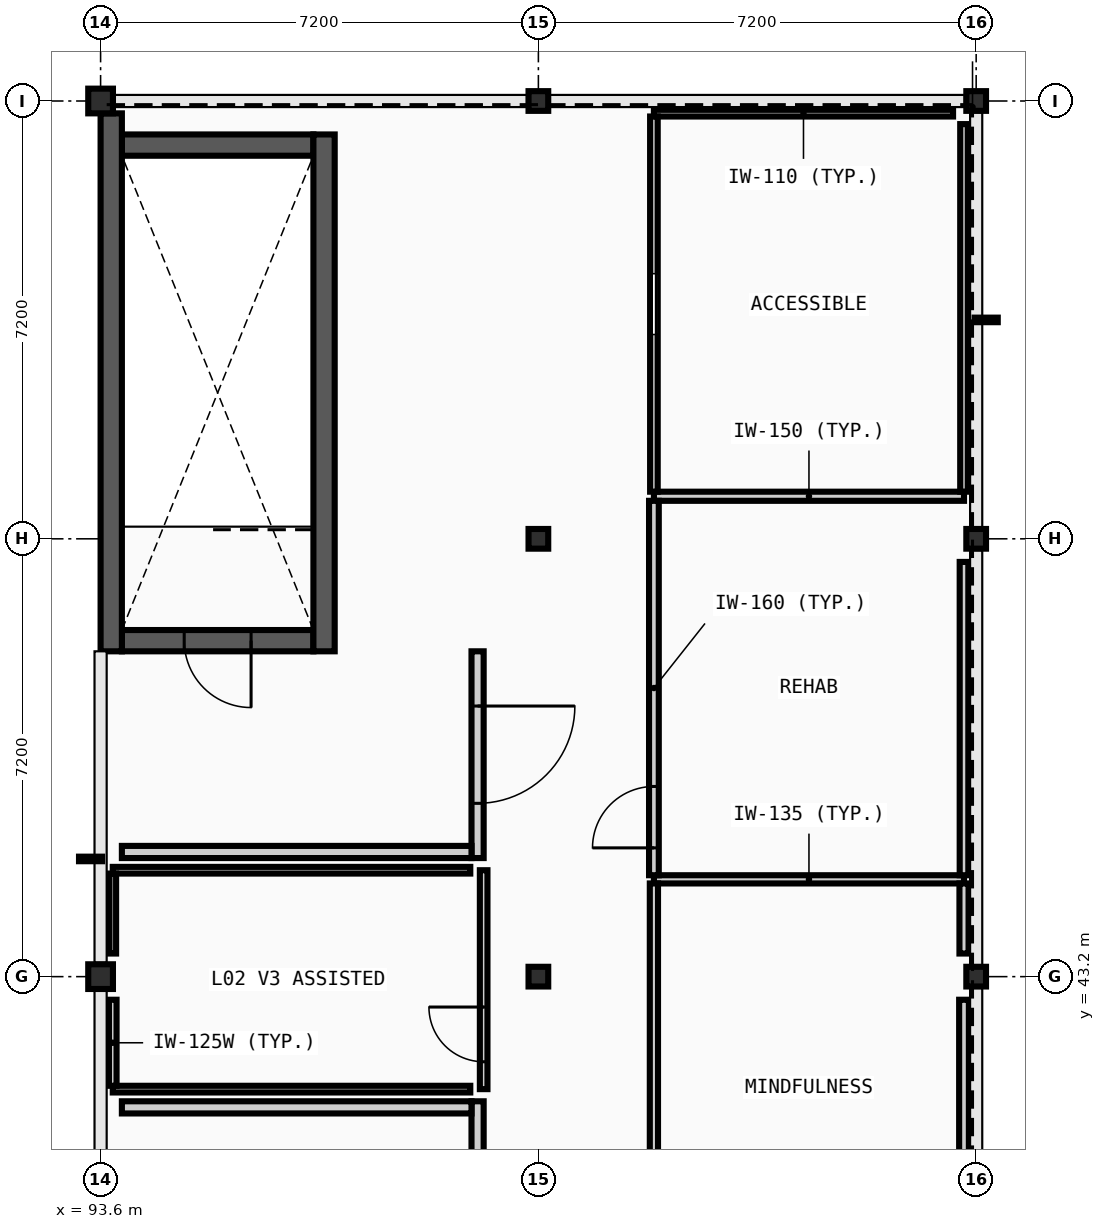
"""IFC4 building model, lengths in metres.
Left out: names, types, materials, properties, quantities, classifications, styles, units other than length and angle.
Written with IfcOpenShell. Run it as: python <this file> out.ifc"""

import sys

from ifc_helpers import new_model, si_unit, direction, frame, frame_2d, origin, origin_2d, place, context, subcontext, project, spatial, rectangle, hollow_circle, extrude, element, fill, save


model = new_model("IFC4")
c1 = context("Model", 3, precision=1e-05, world=origin(), true_north=direction((0.0, 1.0)))
c2 = subcontext(c1, "Body", "Model", "MODEL_VIEW")
j1 = project(units=[si_unit("LENGTHUNIT", "METRE"), si_unit("PLANEANGLEUNIT", "RADIAN")], contexts=[c1])
p1 = place(None, origin())
s1 = spatial("IfcSite", under=j1, at=p1, CompositionType="ELEMENT")
p2 = place(p1, origin())
s2 = spatial("IfcBuilding", under=s1, at=p2, CompositionType="ELEMENT")
p3 = place(p2, frame((0.0, 0.0, 9.6)))
s3 = spatial("IfcBuildingStorey", under=s2, at=p3, CompositionType="ELEMENT", Elevation=9.6)
for number, where, z_axis, x_axis in (
    (1, (93.6, 43.2, 0.0), (0.0, 0.0, 1.0), (1.0, 0.0, 0.0)),
    (2, (93.6, 57.6, 0.0), (0.0, 0.0, 1.0), (1.0, 0.0, 0.0)),
):
    element("IfcColumn", number, at=place(p3, frame(where, z_axis=z_axis, x_axis=x_axis)), inside=s3, PredefinedType="COLUMN", context=c2, shape_type="SweptSolid", body=[
        extrude(hollow_circle(Radius=0.203, WallThickness=0.016, at=origin_2d()), origin(), (0.0, 0.0, 1.0), 4.4),
    ])
for number, where, z_axis, x_axis in (
    (3, (100.8, 43.2, 0.0), (0.0, 0.0, 1.0), (1.0, 0.0, 0.0)),
    (4, (100.8, 50.4, 0.0), (0.0, 0.0, 1.0), (1.0, 0.0, 0.0)),
    (5, (100.8, 57.6, 0.0), (0.0, 0.0, 1.0), (1.0, 0.0, 0.0)),
    (6, (108.0, 43.2, 0.0), (0.0, 0.0, 1.0), (1.0, 0.0, 0.0)),
    (7, (108.0, 50.4, 0.0), (0.0, 0.0, 1.0), (1.0, 0.0, 0.0)),
    (8, (108.0, 57.6, 0.0), (0.0, 0.0, 1.0), (1.0, 0.0, 0.0)),
):
    element("IfcColumn", number, at=place(p3, frame(where, z_axis=z_axis, x_axis=x_axis)), inside=s3, PredefinedType="COLUMN", context=c2, shape_type="SweptSolid", body=[
        extrude(hollow_circle(Radius=0.162, WallThickness=0.012, at=origin_2d()), origin(), (0.0, 0.0, 1.0), 4.4),
    ])
p4 = place(p3, frame((99.8, 37.75, 0.0), z_axis=(0.0, 0.0, 1.0), x_axis=(0.0, 1.0, 0.0)))
e9 = element("IfcWall", 9, at=p4, inside=s3, PredefinedType="PARTITIONING", context=c2, shape_type="SweptSolid", body=[
    extrude(rectangle(XDim=3.4, YDim=0.2, at=frame_2d((1.7, 0.0))), origin(), (0.0, 0.0, 1.0), 4.18),
])
p5 = place(p4, frame((0.9, 0.0, 0.0)))
e10 = element("IfcOpeningElement", 10, at=p5, cuts=e9, PredefinedType="OPENING", context=c2, shape_type="SweptSolid", body=[
    extrude(rectangle(XDim=1.6, YDim=2.2, at=frame_2d((0.8, 1.1))), frame((0.0, 0.11, 0.0), z_axis=(0.0, -1.0, 0.0), x_axis=(1.0, 0.0, 0.0)), (0.0, 0.0, 1.0), 0.22),
])
p6 = place(p3, frame((93.95, 41.05, 0.0), z_axis=(0.0, 0.0, 1.0), x_axis=(1.0, 0.0, 0.0)))
e11 = element("IfcWall", 11, at=p6, inside=s3, PredefinedType="PARTITIONING", context=c2, shape_type="SweptSolid", body=[
    extrude(rectangle(XDim=5.75, YDim=0.2, at=frame_2d((2.875, 0.0))), origin(), (0.0, 0.0, 1.0), 4.18),
])
p7 = place(p3, frame((93.95, 48.725, 0.0), z_axis=(0.0, 0.0, 1.0), x_axis=(1.0, 0.0, 0.0)))
e12 = element("IfcWall", 12, at=p7, inside=s3, PredefinedType="SHEAR", context=c2, shape_type="SweptSolid", body=[
    extrude(rectangle(XDim=3.15, YDim=0.35, at=frame_2d((1.575, 0.0))), origin(), (0.0, 0.0, 1.0), 4.18),
])
p8 = place(p7, frame((1.025, 0.0, 0.0)))
e13 = element("IfcOpeningElement", 13, at=p8, cuts=e12, PredefinedType="OPENING", context=c2, shape_type="SweptSolid", body=[
    extrude(rectangle(XDim=1.1, YDim=2.15, at=frame_2d((0.55, 1.075))), frame((0.0, 0.185, 0.0), z_axis=(0.0, -1.0, 0.0), x_axis=(1.0, 0.0, 0.0)), (0.0, 0.0, 1.0), 0.37),
])
p9 = place(p3, frame((93.95, 56.875, 0.0), z_axis=(0.0, 0.0, 1.0), x_axis=(1.0, 0.0, 0.0)))
e14 = element("IfcWall", 14, at=p9, inside=s3, PredefinedType="SHEAR", context=c2, shape_type="SweptSolid", body=[
    extrude(rectangle(XDim=3.15, YDim=0.35, at=frame_2d((1.575, 0.0))), origin(), (0.0, 0.0, 1.0), 4.18),
])
p10 = place(p3, frame((93.775, 48.55, 0.0), z_axis=(0.0, 0.0, 1.0), x_axis=(0.0, 1.0, 0.0)))
e15 = element("IfcWall", 15, at=p10, inside=s3, PredefinedType="SHEAR", context=c2, shape_type="SweptSolid", body=[
    extrude(rectangle(XDim=8.847, YDim=0.35, at=frame_2d((4.423, 0.0))), origin(), (0.0, 0.0, 1.0), 4.0),
])
p11 = place(p3, frame((97.275, 48.55, 0.0), z_axis=(0.0, 0.0, 1.0), x_axis=(0.0, 1.0, 0.0)))
e16 = element("IfcWall", 16, at=p11, inside=s3, PredefinedType="SHEAR", context=c2, shape_type="SweptSolid", body=[
    extrude(rectangle(XDim=8.5, YDim=0.35, at=frame_2d((4.25, 0.0))), origin(), (0.0, 0.0, 1.0), 4.18),
])
p12 = place(p3, frame((99.8, 45.15, 0.0), z_axis=(0.0, 0.0, 1.0), x_axis=(0.0, 1.0, 0.0)))
e17 = element("IfcWall", 17, at=p12, inside=s3, PredefinedType="PARTITIONING", context=c2, shape_type="SweptSolid", body=[
    extrude(rectangle(XDim=3.4, YDim=0.2, at=frame_2d((1.7, 0.0))), origin(), (0.0, 0.0, 1.0), 4.18),
])
p13 = place(p12, frame((0.9, 0.0, 0.0)))
e18 = element("IfcOpeningElement", 18, at=p13, cuts=e17, PredefinedType="OPENING", context=c2, shape_type="SweptSolid", body=[
    extrude(rectangle(XDim=1.6, YDim=2.2, at=frame_2d((0.8, 1.1))), frame((0.0, 0.11, 0.0), z_axis=(0.0, -1.0, 0.0), x_axis=(1.0, 0.0, 0.0)), (0.0, 0.0, 1.0), 0.22),
])
p14 = place(p3, frame((93.95, 45.25, 0.0), z_axis=(0.0, 0.0, 1.0), x_axis=(1.0, 0.0, 0.0)))
e19 = element("IfcWall", 19, at=p14, inside=s3, PredefinedType="PARTITIONING", context=c2, shape_type="SweptSolid", body=[
    extrude(rectangle(XDim=5.75, YDim=0.2, at=frame_2d((2.875, 0.0))), origin(), (0.0, 0.0, 1.0), 4.18),
])
p15 = place(p3, frame((93.8, 41.35, 0.0), z_axis=(0.0, 0.0, 1.0), x_axis=(1.0, 0.0, 0.0)))
e20 = element("IfcWall", 20, at=p15, inside=s3, PredefinedType="PARTITIONING", context=c2, shape_type="SweptSolid", body=[
    extrude(rectangle(XDim=5.88, YDim=0.11, at=frame_2d((2.94, 0.0))), origin(), (0.0, 0.0, 1.0), 4.18),
])
p16 = place(p3, frame((102.7, 44.8, 0.0), z_axis=(0.0, 0.0, 1.0), x_axis=(1.0, 0.0, 0.0)))
e21 = element("IfcWall", 21, at=p16, inside=s3, PredefinedType="PARTITIONING", context=c2, shape_type="SweptSolid", body=[
    extrude(rectangle(XDim=5.1, YDim=0.135, at=frame_2d((2.55, 0.0))), origin(), (0.0, 0.0, 1.0), 4.18),
])
p17 = place(p3, frame((93.8, 44.95, 0.0), z_axis=(0.0, 0.0, 1.0), x_axis=(1.0, 0.0, 0.0)))
e22 = element("IfcWall", 22, at=p17, inside=s3, PredefinedType="PARTITIONING", context=c2, shape_type="SweptSolid", body=[
    extrude(rectangle(XDim=5.88, YDim=0.11, at=frame_2d((2.94, 0.0))), origin(), (0.0, 0.0, 1.0), 4.18),
])
p18 = place(p3, frame((102.7, 51.1, 0.0), z_axis=(0.0, 0.0, 1.0), x_axis=(1.0, 0.0, 0.0)))
e23 = element("IfcWall", 23, at=p18, inside=s3, PredefinedType="PARTITIONING", context=c2, shape_type="SweptSolid", body=[
    extrude(rectangle(XDim=5.1, YDim=0.15, at=frame_2d((2.55, 0.0))), origin(), (0.0, 0.0, 1.0), 4.18),
])
p19 = place(p3, frame((102.7, 57.4, 0.0), z_axis=(0.0, 0.0, 1.0), x_axis=(1.0, 0.0, 0.0)))
e24 = element("IfcWall", 24, at=p19, inside=s3, PredefinedType="PARTITIONING", context=c2, shape_type="SweptSolid", body=[
    extrude(rectangle(XDim=4.92, YDim=0.11, at=frame_2d((2.46, 0.0))), origin(), (0.0, 0.0, 1.0), 4.005),
])
p20 = place(p3, frame((93.8, 41.405, 0.0), z_axis=(0.0, 0.0, 1.0), x_axis=(0.0, 1.0, 0.0)))
e25 = element("IfcWall", 25, at=p20, inside=s3, PredefinedType="PARTITIONING", context=c2, shape_type="SweptSolid", body=[
    extrude(rectangle(XDim=1.415, YDim=0.125, at=frame_2d((0.708, 0.0))), origin(), (0.0, 0.0, 1.0), 3.985),
])
p21 = place(p3, frame((93.8, 43.58, 0.0), z_axis=(0.0, 0.0, 1.0), x_axis=(0.0, 1.0, 0.0)))
e26 = element("IfcWall", 26, at=p21, inside=s3, PredefinedType="PARTITIONING", context=c2, shape_type="SweptSolid", body=[
    extrude(rectangle(XDim=1.315, YDim=0.11, at=frame_2d((0.657, 0.0))), origin(), (0.0, 0.0, 1.0), 3.985),
])
p22 = place(p3, frame((99.9, 41.35, 0.0), z_axis=(0.0, 0.0, 1.0), x_axis=(0.0, 1.0, 0.0)))
e27 = element("IfcWall", 27, at=p22, inside=s3, PredefinedType="PARTITIONING", context=c2, shape_type="SweptSolid", body=[
    extrude(rectangle(XDim=3.6, YDim=0.125, at=frame_2d((1.8, 0.0))), origin(), (0.0, 0.0, 1.0), 4.18),
])
p23 = place(p22, frame((0.45, 0.0, 0.0)))
e28 = element("IfcOpeningElement", 28, at=p23, cuts=e27, PredefinedType="OPENING", context=c2, shape_type="SweptSolid", body=[
    extrude(rectangle(XDim=0.9, YDim=2.1, at=frame_2d((0.45, 1.05))), frame((0.0, 0.073, 0.0), z_axis=(0.0, -1.0, 0.0), x_axis=(1.0, 0.0, 0.0)), (0.0, 0.0, 1.0), 0.145),
])
p24 = place(p3, frame((102.7, 38.03, 0.0), z_axis=(0.0, 0.0, 1.0), x_axis=(0.0, 1.0, 0.0)))
e29 = element("IfcWall", 29, at=p24, inside=s3, PredefinedType="PARTITIONING", context=c2, shape_type="SweptSolid", body=[
    extrude(rectangle(XDim=6.702, YDim=0.135, at=frame_2d((3.351, 0.0))), origin(), (0.0, 0.0, 1.0), 4.18),
])
p25 = place(p24, frame((0.45, 0.0, 0.0)))
e30 = element("IfcOpeningElement", 30, at=p25, cuts=e29, PredefinedType="OPENING", context=c2, shape_type="SweptSolid", body=[
    extrude(rectangle(XDim=0.984, YDim=2.152, at=frame_2d((0.492, 1.076))), frame((0.0, 0.078, 0.0), z_axis=(0.0, -1.0, 0.0), x_axis=(1.0, 0.0, 0.0)), (0.0, 0.0, 1.0), 0.155),
])
p26 = place(p3, frame((102.7, 44.867, 0.0), z_axis=(0.0, 0.0, 1.0), x_axis=(0.0, 1.0, 0.0)))
e31 = element("IfcWall", 31, at=p26, inside=s3, PredefinedType="PARTITIONING", context=c2, shape_type="SweptSolid", body=[
    extrude(rectangle(XDim=6.157, YDim=0.16, at=frame_2d((3.079, 0.0))), origin(), (0.0, 0.0, 1.0), 4.18),
])
p27 = place(p26, frame((0.45, 0.0, 0.0)))
e32 = element("IfcOpeningElement", 32, at=p27, cuts=e31, PredefinedType="OPENING", context=c2, shape_type="SweptSolid", body=[
    extrude(rectangle(XDim=1.01, YDim=2.152, at=frame_2d((0.505, 1.076))), frame((0.0, 0.09, 0.0), z_axis=(0.0, -1.0, 0.0), x_axis=(1.0, 0.0, 0.0)), (0.0, 0.0, 1.0), 0.18),
])
p28 = place(p3, frame((102.7, 51.175, 0.0), z_axis=(0.0, 0.0, 1.0), x_axis=(0.0, 1.0, 0.0)))
e33 = element("IfcWall", 33, at=p28, inside=s3, PredefinedType="PARTITIONING", context=c2, shape_type="SweptSolid", body=[
    extrude(rectangle(XDim=6.17, YDim=0.125, at=frame_2d((3.085, 0.0))), origin(), (0.0, 0.0, 1.0), 4.18),
])
p29 = place(p28, frame((2.585, 0.0, 0.0)))
e34 = element("IfcOpeningElement", 34, at=p29, cuts=e33, PredefinedType="OPENING", context=c2, shape_type="SweptSolid", body=[
    extrude(rectangle(XDim=1.0, YDim=2.1, at=frame_2d((0.5, 1.05))), frame((0.0, 0.073, 0.0), z_axis=(0.0, -1.0, 0.0), x_axis=(1.0, 0.0, 0.0)), (0.0, 0.0, 1.0), 0.145),
])
p30 = place(p3, frame((107.8, 38.03, 0.0), z_axis=(0.0, 0.0, 1.0), x_axis=(0.0, 1.0, 0.0)))
e35 = element("IfcWall", 35, at=p30, inside=s3, PredefinedType="PARTITIONING", context=c2, shape_type="SweptSolid", body=[
    extrude(rectangle(XDim=4.79, YDim=0.16, at=frame_2d((2.395, 0.0))), origin(), (0.0, 0.0, 1.0), 4.18),
])
p31 = place(p3, frame((107.8, 43.58, 0.0), z_axis=(0.0, 0.0, 1.0), x_axis=(0.0, 1.0, 0.0)))
e36 = element("IfcWall", 36, at=p31, inside=s3, PredefinedType="PARTITIONING", context=c2, shape_type="SweptSolid", body=[
    extrude(rectangle(XDim=1.152, YDim=0.15, at=frame_2d((0.576, 0.0))), origin(), (0.0, 0.0, 1.0), 4.18),
])
p32 = place(p3, frame((107.8, 44.867, 0.0), z_axis=(0.0, 0.0, 1.0), x_axis=(0.0, 1.0, 0.0)))
e37 = element("IfcWall", 37, at=p32, inside=s3, PredefinedType="PARTITIONING", context=c2, shape_type="SweptSolid", body=[
    extrude(rectangle(XDim=5.153, YDim=0.142, at=frame_2d((2.576, 0.0))), origin(), (0.0, 0.0, 1.0), 4.18),
])
p33 = place(p3, frame((107.8, 51.175, 0.0), z_axis=(0.0, 0.0, 1.0), x_axis=(0.0, 1.0, 0.0)))
e38 = element("IfcWall", 38, at=p33, inside=s3, PredefinedType="PARTITIONING", context=c2, shape_type="SweptSolid", body=[
    extrude(rectangle(XDim=6.045, YDim=0.125, at=frame_2d((3.022, 0.0))), origin(), (0.0, 0.0, 1.0), 4.18),
])
p34 = place(p8, origin())
e39 = element("IfcDoor", 39, at=p34, inside=s3, OperationType="SINGLE_SWING_RIGHT", PredefinedType="DOOR", context=c2, shape_type="SweptSolid", body=[
    extrude(rectangle(XDim=1.1, YDim=2.15, at=frame_2d((0.55, 1.075))), frame((0.0, 0.025, 0.0), z_axis=(0.0, -1.0, 0.0), x_axis=(1.0, 0.0, 0.0)), (0.0, 0.0, 1.0), 0.05),
])
fill(e13, e39)
p35 = place(p13, origin())
e40 = element("IfcDoor", 40, at=p35, inside=s3, OperationType="DOUBLE_DOOR_SINGLE_SWING", PredefinedType="DOOR", context=c2, shape_type="SweptSolid", body=[
    extrude(rectangle(XDim=1.6, YDim=2.2, at=frame_2d((0.8, 1.1))), frame((0.0, 0.025, 0.0), z_axis=(0.0, -1.0, 0.0), x_axis=(1.0, 0.0, 0.0)), (0.0, 0.0, 1.0), 0.05),
])
fill(e18, e40)
p36 = place(p27, origin())
e41 = element("IfcDoor", 41, at=p36, inside=s3, OperationType="SINGLE_SWING_LEFT", PredefinedType="DOOR", context=c2, shape_type="SweptSolid", body=[
    extrude(rectangle(XDim=1.01, YDim=2.152, at=frame_2d((0.505, 1.076))), frame((0.0, 0.025, 0.0), z_axis=(0.0, -1.0, 0.0), x_axis=(1.0, 0.0, 0.0)), (0.0, 0.0, 1.0), 0.05),
])
fill(e32, e41)
p37 = place(p29, origin())
e42 = element("IfcDoor", 42, at=p37, inside=s3, OperationType="SLIDING_TO_LEFT", PredefinedType="DOOR", context=c2, shape_type="SweptSolid", body=[
    extrude(rectangle(XDim=1.0, YDim=2.1, at=frame_2d((0.5, 1.05))), frame((0.0, 0.025, 0.0), z_axis=(0.0, -1.0, 0.0), x_axis=(1.0, 0.0, 0.0)), (0.0, 0.0, 1.0), 0.05),
])
fill(e34, e42)
p38 = place(p23, frame((0.9, 0.0, 0.0), z_axis=(0.0, 0.0, 1.0), x_axis=(-1.0, 0.0, 0.0)))
e43 = element("IfcDoor", 43, at=p38, inside=s3, OperationType="SINGLE_SWING_RIGHT", PredefinedType="DOOR", context=c2, shape_type="SweptSolid", body=[
    extrude(rectangle(XDim=0.9, YDim=2.1, at=frame_2d((0.45, 1.05))), frame((0.0, 0.025, 0.0), z_axis=(0.0, -1.0, 0.0), x_axis=(1.0, 0.0, 0.0)), (0.0, 0.0, 1.0), 0.05),
])
fill(e28, e43)
save(model, sys.argv[1])
